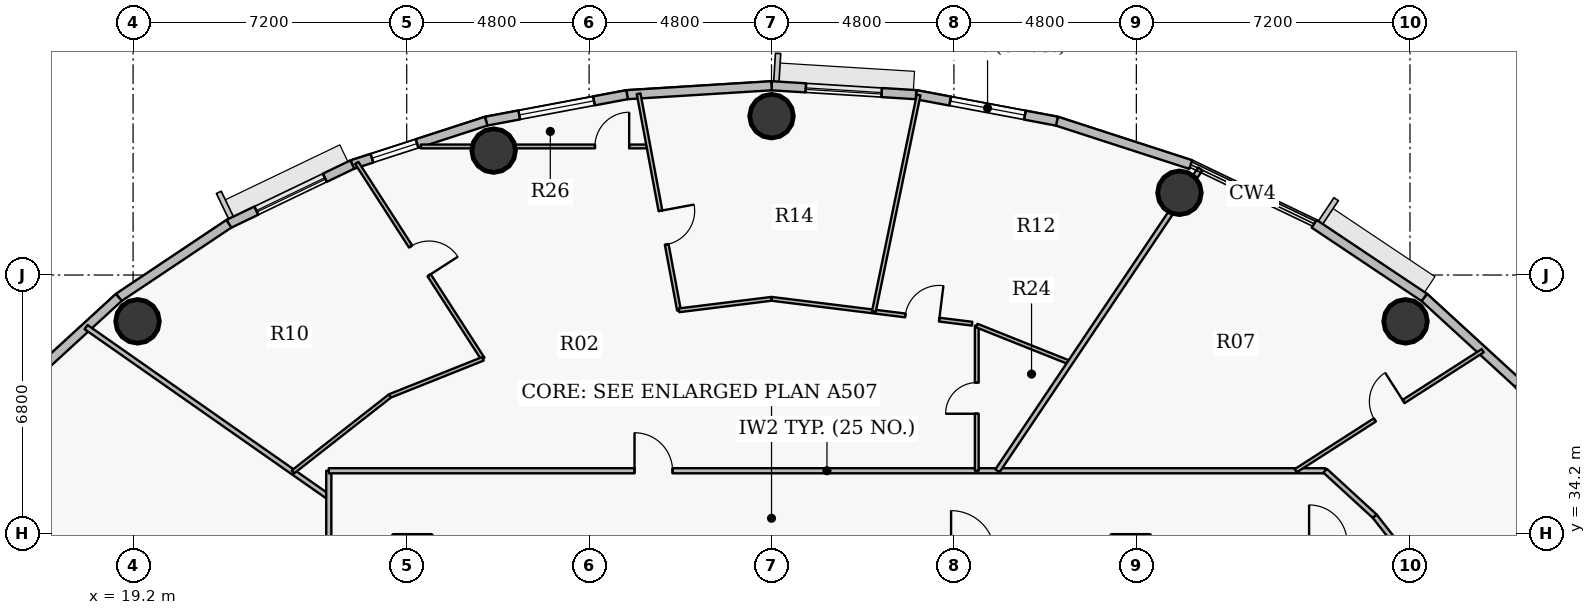
"""IFC4 building model, lengths in metres.
Left out: names, types, materials, properties, quantities, classifications, styles, units other than length and angle.
Written with IfcOpenShell. Run it as: python <this file> out.ifc"""

import sys

from ifc_helpers import new_model, si_unit, direction, frame, frame_2d, origin, origin_2d, place, context, subcontext, project, spatial, rectangle, hollow_circle, extrude, source, transform, mapped, element, fill, save


model = new_model("IFC4")
c1 = context("Model", 3, precision=1e-05, world=origin(), true_north=direction((0.0, 1.0)))
c2 = subcontext(c1, "Body", "Model", "MODEL_VIEW")
j1 = project(units=[si_unit("LENGTHUNIT", "METRE"), si_unit("PLANEANGLEUNIT", "RADIAN")], contexts=[c1])
p1 = place(None, origin())
s1 = spatial("IfcSite", under=j1, at=p1, CompositionType="ELEMENT")
p2 = place(p1, origin())
s2 = spatial("IfcBuilding", under=s1, at=p2, CompositionType="ELEMENT")
p3 = place(p2, frame((0.0, 0.0, 259.05)))
s3 = spatial("IfcBuildingStorey", under=s2, at=p3, CompositionType="ELEMENT", Elevation=259.05)
for number, where, z_axis, x_axis in (
    (1, (52.683, 39.781, 0.0), (0.0, 0.0, 1.0), (1.0, 0.0, 0.0)),
    (2, (46.735, 43.164, 0.0), (0.0, 0.0, 1.0), (1.0, 0.0, 0.0)),
    (3, (36.0, 45.18, 0.0), (0.0, 0.0, 1.0), (1.0, 0.0, 0.0)),
    (4, (28.688, 44.273, 0.0), (0.0, 0.0, 1.0), (1.0, 0.0, 0.0)),
    (5, (19.317, 39.781, 0.0), (0.0, 0.0, 1.0), (1.0, 0.0, 0.0)),
):
    element("IfcColumn", number, at=place(p3, frame(where, z_axis=z_axis, x_axis=x_axis)), inside=s3, PredefinedType="COLUMN", context=c2, shape_type="SweptSolid", body=[
        extrude(hollow_circle(Radius=0.575, WallThickness=0.036, at=origin_2d()), origin(), (0.0, 0.0, 1.0), 3.75),
    ])
p4 = place(p3, frame((55.648, 38.145, 0.0), z_axis=(0.0, 0.0, 1.0), x_axis=(0.616312344705, -0.787501805562, 0.0)))
e6 = element("IfcWall", 6, at=p4, inside=s3, PredefinedType="SOLIDWALL", context=c2, shape_type="SweptSolid", body=[
    extrude(rectangle(XDim=3.225, YDim=0.24, at=frame_2d((1.612, 0.0))), origin(), (0.0, 0.0, 1.0), 3.45),
])
p5 = place(p4, frame((0.812, 0.0, 0.9)))
e7 = element("IfcOpeningElement", 7, at=p5, cuts=e6, PredefinedType="OPENING", context=c2, shape_type="SweptSolid", body=[
    extrude(rectangle(XDim=1.6, YDim=1.75, at=origin_2d()), frame((0.8, 0.13, 0.875), z_axis=(0.0, -1.0, 0.0), x_axis=(1.0, 0.0, 0.0)), (0.0, 0.0, 1.0), 0.26),
])
p6 = place(p3, frame((53.176, 40.411, 0.0), z_axis=(0.0, 0.0, 1.0), x_axis=(0.737123922599, -0.675757591694, 0.0)))
e8 = element("IfcWall", 8, at=p6, inside=s3, PredefinedType="SOLIDWALL", context=c2, shape_type="SweptSolid", body=[
    extrude(rectangle(XDim=3.354, YDim=0.24, at=frame_2d((1.677, 0.0))), origin(), (0.0, 0.0, 1.0), 3.45),
])
p7 = place(p3, frame((50.28, 42.348, 0.0), z_axis=(0.0, 0.0, 1.0), x_axis=(0.831262496074, -0.555880079352, 0.0)))
e9 = element("IfcWall", 9, at=p7, inside=s3, PredefinedType="SOLIDWALL", context=c2, shape_type="SweptSolid", body=[
    extrude(rectangle(XDim=3.484, YDim=0.24, at=frame_2d((1.742, 0.0))), origin(), (0.0, 0.0, 1.0), 3.45),
])
p8 = place(p3, frame((43.509, 45.049, 0.0), z_axis=(0.0, 0.0, 1.0), x_axis=(0.951210789182, -0.308541787354, 0.0)))
e10 = element("IfcWall", 10, at=p8, inside=s3, PredefinedType="SOLIDWALL", context=c2, shape_type="SweptSolid", body=[
    extrude(rectangle(XDim=3.702, YDim=0.24, at=frame_2d((1.851, 0.0))), origin(), (0.0, 0.0, 1.0), 3.45),
])
p9 = place(p3, frame((39.802, 45.746, 0.0), z_axis=(0.0, 0.0, 1.0), x_axis=(0.982784898575, -0.184753465822, 0.0)))
e11 = element("IfcWall", 11, at=p9, inside=s3, PredefinedType="SOLIDWALL", context=c2, shape_type="SweptSolid", body=[
    extrude(rectangle(XDim=3.773, YDim=0.24, at=frame_2d((1.886, 0.0))), origin(), (0.0, 0.0, 1.0), 3.45),
])
p10 = place(p9, frame((0.916, 0.0, 0.9)))
e12 = element("IfcOpeningElement", 12, at=p10, cuts=e11, PredefinedType="OPENING", context=c2, shape_type="SweptSolid", body=[
    extrude(rectangle(XDim=2.0, YDim=1.75, at=origin_2d()), frame((1.0, 0.13, 0.875), z_axis=(0.0, -1.0, 0.0), x_axis=(1.0, 0.0, 0.0)), (0.0, 0.0, 1.0), 0.26),
])
p11 = place(p3, frame((36.0, 45.98, 0.0), z_axis=(0.0, 0.0, 1.0), x_axis=(0.998108785312, -0.06147237333, 0.0)))
e13 = element("IfcWall", 13, at=p11, inside=s3, PredefinedType="SOLIDWALL", context=c2, shape_type="SweptSolid", body=[
    extrude(rectangle(XDim=3.809, YDim=0.24, at=frame_2d((1.904, 0.0))), origin(), (0.0, 0.0, 1.0), 3.45),
])
p12 = place(p11, frame((0.904, 0.0, 0.9)))
e14 = element("IfcOpeningElement", 14, at=p12, cuts=e13, PredefinedType="OPENING", context=c2, shape_type="SweptSolid", body=[
    extrude(rectangle(XDim=2.0, YDim=1.75, at=origin_2d()), frame((1.0, 0.13, 0.875), z_axis=(0.0, -1.0, 0.0), x_axis=(1.0, 0.0, 0.0)), (0.0, 0.0, 1.0), 0.26),
])
p13 = place(p3, frame((32.198, 45.746, 0.0), z_axis=(0.0, 0.0, 1.0), x_axis=(0.998108785312, 0.06147237333, 0.0)))
e15 = element("IfcWall", 15, at=p13, inside=s3, PredefinedType="SOLIDWALL", context=c2, shape_type="SweptSolid", body=[
    extrude(rectangle(XDim=3.809, YDim=0.24, at=frame_2d((1.904, 0.0))), origin(), (0.0, 0.0, 1.0), 3.45),
])
p14 = place(p3, frame((28.491, 45.049, 0.0), z_axis=(0.0, 0.0, 1.0), x_axis=(0.982784898575, 0.184753465822, 0.0)))
e16 = element("IfcWall", 16, at=p14, inside=s3, PredefinedType="SOLIDWALL", context=c2, shape_type="SweptSolid", body=[
    extrude(rectangle(XDim=3.773, YDim=0.24, at=frame_2d((1.886, 0.0))), origin(), (0.0, 0.0, 1.0), 3.45),
])
p15 = place(p14, frame((0.886, 0.0, 0.9)))
e17 = element("IfcOpeningElement", 17, at=p15, cuts=e16, PredefinedType="OPENING", context=c2, shape_type="SweptSolid", body=[
    extrude(rectangle(XDim=2.0, YDim=1.75, at=origin_2d()), frame((1.0, 0.13, 0.875), z_axis=(0.0, -1.0, 0.0), x_axis=(1.0, 0.0, 0.0)), (0.0, 0.0, 1.0), 0.26),
])
p16 = place(p3, frame((24.969, 43.906, 0.0), z_axis=(0.0, 0.0, 1.0), x_axis=(0.951210789182, 0.308541787354, 0.0)))
e18 = element("IfcWall", 18, at=p16, inside=s3, PredefinedType="SOLIDWALL", context=c2, shape_type="SweptSolid", body=[
    extrude(rectangle(XDim=3.702, YDim=0.24, at=frame_2d((1.851, 0.0))), origin(), (0.0, 0.0, 1.0), 3.45),
])
p17 = place(p16, frame((0.542, 0.0, 0.9)))
e19 = element("IfcOpeningElement", 19, at=p17, cuts=e18, PredefinedType="OPENING", context=c2, shape_type="SweptSolid", body=[
    extrude(rectangle(XDim=1.25, YDim=1.65, at=origin_2d()), frame((0.625, 0.13, 0.825), z_axis=(0.0, -1.0, 0.0), x_axis=(1.0, 0.0, 0.0)), (0.0, 0.0, 1.0), 0.26),
])
p18 = place(p3, frame((21.72, 42.348, 0.0), z_axis=(0.0, 0.0, 1.0), x_axis=(0.901598104751, 0.432574684313, 0.0)))
e20 = element("IfcWall", 20, at=p18, inside=s3, PredefinedType="SOLIDWALL", context=c2, shape_type="SweptSolid", body=[
    extrude(rectangle(XDim=3.604, YDim=0.24, at=frame_2d((1.802, 0.0))), origin(), (0.0, 0.0, 1.0), 3.45),
])
p19 = place(p18, frame((0.802, 0.0, 0.9)))
e21 = element("IfcOpeningElement", 21, at=p19, cuts=e20, PredefinedType="OPENING", context=c2, shape_type="SweptSolid", body=[
    extrude(rectangle(XDim=2.0, YDim=1.75, at=origin_2d()), frame((1.0, 0.13, 0.875), z_axis=(0.0, -1.0, 0.0), x_axis=(1.0, 0.0, 0.0)), (0.0, 0.0, 1.0), 0.26),
])
p20 = place(p3, frame((18.824, 40.411, 0.0), z_axis=(0.0, 0.0, 1.0), x_axis=(0.831262496074, 0.555880079352, 0.0)))
e22 = element("IfcWall", 22, at=p20, inside=s3, PredefinedType="SOLIDWALL", context=c2, shape_type="SweptSolid", body=[
    extrude(rectangle(XDim=3.484, YDim=0.24, at=frame_2d((1.742, 0.0))), origin(), (0.0, 0.0, 1.0), 3.45),
])
p21 = place(p3, frame((16.352, 38.145, 0.0), z_axis=(0.0, 0.0, 1.0), x_axis=(0.737123922599, 0.675757591694, 0.0)))
e23 = element("IfcWall", 23, at=p21, inside=s3, PredefinedType="SOLIDWALL", context=c2, shape_type="SweptSolid", body=[
    extrude(rectangle(XDim=3.354, YDim=0.24, at=frame_2d((1.677, 0.0))), origin(), (0.0, 0.0, 1.0), 3.45),
])
p22 = place(p3, frame((17.964, 39.629, 0.0), z_axis=(0.0, 0.0, 1.0), x_axis=(0.819162769896, -0.573561118292, 0.0)))
e24 = element("IfcWall", 24, at=p22, inside=s3, PredefinedType="PARTITIONING", context=c2, shape_type="SweptSolid", body=[
    extrude(rectangle(XDim=7.796, YDim=0.135, at=frame_2d((3.898, 0.0))), origin(), (0.0, 0.0, 1.0), 2.935),
])
p23 = place(p3, frame((23.406, 35.819, 0.0), z_axis=(0.0, 0.0, 1.0), x_axis=(0.787387506959, 0.616458363465, 0.0)))
e25 = element("IfcWall", 25, at=p23, inside=s3, PredefinedType="PARTITIONING", context=c2, shape_type="SweptSolid", body=[
    extrude(rectangle(XDim=3.245, YDim=0.1, at=frame_2d((1.623, 0.0))), origin(), (0.0, 0.0, 1.0), 2.885),
])
p24 = place(p3, frame((24.35, 27.95, 0.0), z_axis=(0.0, 0.0, 1.0), x_axis=(0.0, 1.0, 0.0)))
e26 = element("IfcWall", 26, at=p24, inside=s3, PredefinedType="PARTITIONING", context=c2, shape_type="SweptSolid", body=[
    extrude(rectangle(XDim=7.9, YDim=0.135, at=frame_2d((3.95, 0.0))), origin(), (0.0, 0.0, 1.0), 2.885),
])
p25 = place(p24, frame((3.099, 0.0, 0.0)))
e27 = element("IfcOpeningElement", 27, at=p25, cuts=e26, PredefinedType="OPENING", context=c2, shape_type="SweptSolid", body=[
    extrude(rectangle(XDim=1.05, YDim=2.15, at=origin_2d()), frame((0.525, 0.078, 1.075), z_axis=(0.0, -1.0, 0.0), x_axis=(1.0, 0.0, 0.0)), (0.0, 0.0, 1.0), 0.155),
])
p26 = place(p3, frame((24.35, 35.85, 0.0), z_axis=(0.0, 0.0, 1.0), x_axis=(1.0, 0.0, 0.0)))
e28 = element("IfcWall", 28, at=p26, inside=s3, PredefinedType="PARTITIONING", context=c2, shape_type="SweptSolid", body=[
    extrude(rectangle(XDim=26.218, YDim=0.135, at=frame_2d((13.109, 0.0))), origin(), (0.0, 0.0, 1.0), 2.885),
])
p27 = place(p26, frame((8.045, 0.0, 0.0)))
e29 = element("IfcOpeningElement", 29, at=p27, cuts=e28, PredefinedType="OPENING", context=c2, shape_type="SweptSolid", body=[
    extrude(rectangle(XDim=1.0, YDim=2.15, at=origin_2d()), frame((0.5, 0.078, 1.075), z_axis=(0.0, -1.0, 0.0), x_axis=(1.0, 0.0, 0.0)), (0.0, 0.0, 1.0), 0.155),
])
p28 = place(p3, frame((25.086, 43.95, 0.0), z_axis=(0.0, 0.0, 1.0), x_axis=(0.54137931016, -0.840778474112, 0.0)))
e30 = element("IfcWall", 30, at=p28, inside=s3, PredefinedType="PARTITIONING", context=c2, shape_type="SweptSolid", body=[
    extrude(rectangle(XDim=6.131, YDim=0.1, at=frame_2d((3.066, 0.0))), origin(), (0.0, 0.0, 1.0), 2.935),
])
p29 = place(p28, frame((2.615, 0.0, 0.0)))
e31 = element("IfcOpeningElement", 31, at=p29, cuts=e30, PredefinedType="OPENING", context=c2, shape_type="SweptSolid", body=[
    extrude(rectangle(XDim=0.9, YDim=2.1, at=origin_2d()), frame((0.45, 0.06, 1.05), z_axis=(0.0, -1.0, 0.0), x_axis=(1.0, 0.0, 0.0)), (0.0, 0.0, 1.0), 0.12),
])
p30 = place(p3, frame((25.961, 37.819, 0.0), z_axis=(0.0, 0.0, 1.0), x_axis=(0.928796141516, 0.370591051572, 0.0)))
e32 = element("IfcWall", 32, at=p30, inside=s3, PredefinedType="PARTITIONING", context=c2, shape_type="SweptSolid", body=[
    extrude(rectangle(XDim=2.633, YDim=0.1, at=frame_2d((1.316, 0.0))), origin(), (0.0, 0.0, 1.0), 3.45),
])
p31 = place(p3, frame((26.772, 44.383, 0.0), z_axis=(0.0, 0.0, 1.0), x_axis=(1.0, 0.0, 0.0)))
e33 = element("IfcWall", 33, at=p31, inside=s3, PredefinedType="PARTITIONING", context=c2, shape_type="SweptSolid", body=[
    extrude(rectangle(XDim=5.99, YDim=0.1, at=frame_2d((2.995, 0.0))), origin(), (0.0, 0.0, 1.0), 2.935),
])
p32 = place(p31, frame((4.582, 0.0, 0.0)))
e34 = element("IfcOpeningElement", 34, at=p32, cuts=e33, PredefinedType="OPENING", context=c2, shape_type="SweptSolid", body=[
    extrude(rectangle(XDim=0.9, YDim=2.1, at=origin_2d()), frame((0.45, 0.06, 1.05), z_axis=(0.0, -1.0, 0.0), x_axis=(1.0, 0.0, 0.0)), (0.0, 0.0, 1.0), 0.12),
])
p33 = place(p3, frame((32.503, 45.77, 0.0), z_axis=(0.0, 0.0, 1.0), x_axis=(0.183138923076, -0.983087043376, 0.0)))
e35 = element("IfcWall", 35, at=p33, inside=s3, PredefinedType="PARTITIONING", context=c2, shape_type="SweptSolid", body=[
    extrude(rectangle(XDim=5.796, YDim=0.1, at=frame_2d((2.898, 0.0))), origin(), (0.0, 0.0, 1.0), 2.935),
])
p34 = place(p33, frame((3.133, 0.0, 0.0)))
e36 = element("IfcOpeningElement", 36, at=p34, cuts=e35, PredefinedType="OPENING", context=c2, shape_type="SweptSolid", body=[
    extrude(rectangle(XDim=0.9, YDim=2.1, at=origin_2d()), frame((0.45, 0.06, 1.05), z_axis=(0.0, -1.0, 0.0), x_axis=(1.0, 0.0, 0.0)), (0.0, 0.0, 1.0), 0.12),
])
p35 = place(p3, frame((33.565, 40.072, 0.0), z_axis=(0.0, 0.0, 1.0), x_axis=(0.992396815028, 0.1230794927, 0.0)))
e37 = element("IfcWall", 37, at=p35, inside=s3, PredefinedType="PARTITIONING", context=c2, shape_type="SweptSolid", body=[
    extrude(rectangle(XDim=2.454, YDim=0.1, at=frame_2d((1.227, 0.0))), origin(), (0.0, 0.0, 1.0), 2.885),
])
p36 = place(p3, frame((36.0, 40.374, 0.0), z_axis=(0.0, 0.0, 1.0), x_axis=(0.992398169186, -0.123068573551, 0.0)))
e38 = element("IfcWall", 38, at=p36, inside=s3, PredefinedType="PARTITIONING", context=c2, shape_type="SweptSolid", body=[
    extrude(rectangle(XDim=5.319, YDim=0.1, at=frame_2d((2.659, 0.0))), origin(), (0.0, 0.0, 1.0), 2.885),
])
p37 = place(p36, frame((3.546, 0.0, 0.0)))
e39 = element("IfcOpeningElement", 39, at=p37, cuts=e38, PredefinedType="OPENING", context=c2, shape_type="SweptSolid", body=[
    extrude(rectangle(XDim=0.9, YDim=2.1, at=origin_2d()), frame((0.45, 0.06, 1.05), z_axis=(0.0, -1.0, 0.0), x_axis=(1.0, 0.0, 0.0)), (0.0, 0.0, 1.0), 0.12),
])
p38 = place(p3, frame((38.694, 40.04, 0.0), z_axis=(0.0, 0.0, 1.0), x_axis=(0.20228508648, 0.979326678789, 0.0)))
e40 = element("IfcWall", 40, at=p38, inside=s3, PredefinedType="PARTITIONING", context=c2, shape_type="SweptSolid", body=[
    extrude(rectangle(XDim=5.819, YDim=0.1, at=frame_2d((2.909, 0.0))), origin(), (0.0, 0.0, 1.0), 2.935),
])
p39 = place(p3, frame((41.401, 35.85, 0.0), z_axis=(0.0, 0.0, 1.0), x_axis=(0.0, 1.0, 0.0)))
e41 = element("IfcWall", 41, at=p39, inside=s3, PredefinedType="PARTITIONING", context=c2, shape_type="SweptSolid", body=[
    extrude(rectangle(XDim=3.82, YDim=0.1, at=frame_2d((1.91, 0.0))), origin(), (0.0, 0.0, 1.0), 3.45),
])
p40 = place(p39, frame((1.5, 0.0, 0.0)))
e42 = element("IfcOpeningElement", 42, at=p40, cuts=e41, PredefinedType="OPENING", context=c2, shape_type="SweptSolid", body=[
    extrude(rectangle(XDim=0.82, YDim=2.1, at=origin_2d()), frame((0.41, 0.06, 1.05), z_axis=(0.0, -1.0, 0.0), x_axis=(1.0, 0.0, 0.0)), (0.0, 0.0, 1.0), 0.12),
])
p41 = place(p3, frame((41.401, 39.67, 0.0), z_axis=(0.0, 0.0, 1.0), x_axis=(0.92880772077, -0.370562029677, 0.0)))
e43 = element("IfcWall", 43, at=p41, inside=s3, PredefinedType="PARTITIONING", context=c2, shape_type="SweptSolid", body=[
    extrude(rectangle(XDim=2.642, YDim=0.1, at=frame_2d((1.321, 0.0))), origin(), (0.0, 0.0, 1.0), 2.885),
])
p42 = place(p3, frame((41.946, 35.85, 0.0), z_axis=(0.0, 0.0, 1.0), x_axis=(0.557670345873, 0.830062518931, 0.0)))
e44 = element("IfcWall", 44, at=p42, inside=s3, PredefinedType="PARTITIONING", context=c2, shape_type="SweptSolid", body=[
    extrude(rectangle(XDim=9.568, YDim=0.135, at=frame_2d((4.784, 0.0))), origin(), (0.0, 0.0, 1.0), 2.885),
])
p43 = place(p3, frame((49.792, 35.85, 0.0), z_axis=(0.0, 0.0, 1.0), x_axis=(0.841640734873, 0.540037844416, 0.0)))
e45 = element("IfcWall", 45, at=p43, inside=s3, PredefinedType="PARTITIONING", context=c2, shape_type="SweptSolid", body=[
    extrude(rectangle(XDim=5.848, YDim=0.1, at=frame_2d((2.924, 0.0))), origin(), (0.0, 0.0, 1.0), 2.935),
])
p44 = place(p43, frame((2.474, 0.0, 0.0)))
e46 = element("IfcOpeningElement", 46, at=p44, cuts=e45, PredefinedType="OPENING", context=c2, shape_type="SweptSolid", body=[
    extrude(rectangle(XDim=0.9, YDim=2.1, at=origin_2d()), frame((0.45, 0.06, 1.05), z_axis=(0.0, -1.0, 0.0), x_axis=(1.0, 0.0, 0.0)), (0.0, 0.0, 1.0), 0.12),
])
p45 = place(p3, frame((50.568, 35.85, 0.0), z_axis=(0.0, 0.0, 1.0), x_axis=(0.737102657331, -0.675780787353, 0.0)))
e47 = element("IfcWall", 47, at=p45, inside=s3, PredefinedType="PARTITIONING", context=c2, shape_type="SweptSolid", body=[
    extrude(rectangle(XDim=1.772, YDim=0.135, at=frame_2d((0.886, 0.0))), origin(), (0.0, 0.0, 1.0), 3.45),
])
p46 = place(p3, frame((51.874, 34.653, 0.0), z_axis=(0.0, 0.0, 1.0), x_axis=(0.61628613448, -0.787522317429, 0.0)))
e48 = element("IfcWall", 48, at=p46, inside=s3, PredefinedType="PARTITIONING", context=c2, shape_type="SweptSolid", body=[
    extrude(rectangle(XDim=0.893, YDim=0.135, at=frame_2d((0.446, 0.0))), origin(), (0.0, 0.0, 1.0), 3.45),
])
m1 = source(origin(), c2, "Body", "SweptSolid", [
    extrude(rectangle(XDim=2.0, YDim=1.75, at=origin_2d()), frame((1.0, 0.03, 0.875), z_axis=(0.0, -1.0, 0.0), x_axis=(1.0, 0.0, 0.0)), (0.0, 0.0, 1.0), 0.06),
])
p47 = place(p10, origin())
e49 = element("IfcWindow", 49, at=p47, inside=s3, PartitioningType="DOUBLE_PANEL_VERTICAL", PredefinedType="WINDOW", context=c2, shape_type="MappedRepresentation", body=[
    mapped(m1, transform((0.0, 0.0, 0.0), x_axis=(1.0, 0.0, 0.0), y_axis=(0.0, 1.0, 0.0), z_axis=(0.0, 0.0, 1.0), scale=1.0)),
])
fill(e12, e49)
p48 = place(p12, origin())
e50 = element("IfcWindow", 50, at=p48, inside=s3, PartitioningType="DOUBLE_PANEL_VERTICAL", PredefinedType="WINDOW", context=c2, shape_type="MappedRepresentation", body=[
    mapped(m1, transform((0.0, 0.0, 0.0), x_axis=(1.0, 0.0, 0.0), y_axis=(0.0, 1.0, 0.0), z_axis=(0.0, 0.0, 1.0), scale=1.0)),
])
fill(e14, e50)
p49 = place(p15, origin())
e51 = element("IfcWindow", 51, at=p49, inside=s3, PartitioningType="DOUBLE_PANEL_VERTICAL", PredefinedType="WINDOW", context=c2, shape_type="MappedRepresentation", body=[
    mapped(m1, transform((0.0, 0.0, 0.0), x_axis=(1.0, 0.0, 0.0), y_axis=(0.0, 1.0, 0.0), z_axis=(0.0, 0.0, 1.0), scale=1.0)),
])
fill(e17, e51)
p50 = place(p19, origin())
e52 = element("IfcWindow", 52, at=p50, inside=s3, PartitioningType="DOUBLE_PANEL_VERTICAL", PredefinedType="WINDOW", context=c2, shape_type="MappedRepresentation", body=[
    mapped(m1, transform((0.0, 0.0, 0.0), x_axis=(1.0, 0.0, 0.0), y_axis=(0.0, 1.0, 0.0), z_axis=(0.0, 0.0, 1.0), scale=1.0)),
])
fill(e21, e52)
m2 = source(origin(), c2, "Body", "SweptSolid", [
    extrude(rectangle(XDim=1.25, YDim=1.65, at=origin_2d()), frame((0.625, 0.03, 0.825), z_axis=(0.0, -1.0, 0.0), x_axis=(1.0, 0.0, 0.0)), (0.0, 0.0, 1.0), 0.06),
])
p51 = place(p17, origin())
e53 = element("IfcWindow", 53, at=p51, inside=s3, PartitioningType="SINGLE_PANEL", PredefinedType="WINDOW", context=c2, shape_type="MappedRepresentation", body=[
    mapped(m2, transform((0.0, 0.0, 0.0), x_axis=(1.0, 0.0, 0.0), y_axis=(0.0, 1.0, 0.0), z_axis=(0.0, 0.0, 1.0), scale=1.0)),
])
fill(e19, e53)
m3 = source(origin(), c2, "Body", "SweptSolid", [
    extrude(rectangle(XDim=0.9, YDim=2.1, at=origin_2d()), frame((0.45, 0.025, 1.05), z_axis=(0.0, -1.0, 0.0), x_axis=(1.0, 0.0, 0.0)), (0.0, 0.0, 1.0), 0.05),
])
p52 = place(p44, origin())
e54 = element("IfcDoor", 54, at=p52, inside=s3, OperationType="SINGLE_SWING_RIGHT", PredefinedType="DOOR", context=c2, shape_type="MappedRepresentation", body=[
    mapped(m3, transform((0.0, 0.0, 0.0), x_axis=(1.0, 0.0, 0.0), y_axis=(0.0, 1.0, 0.0), z_axis=(0.0, 0.0, 1.0), scale=1.0)),
])
fill(e46, e54)
m4 = source(origin(), c2, "Body", "SweptSolid", [
    extrude(rectangle(XDim=1.0, YDim=2.15, at=origin_2d()), frame((0.5, 0.025, 1.075), z_axis=(0.0, -1.0, 0.0), x_axis=(1.0, 0.0, 0.0)), (0.0, 0.0, 1.0), 0.05),
])
p53 = place(p27, origin())
e55 = element("IfcDoor", 55, at=p53, inside=s3, OperationType="SINGLE_SWING_LEFT", PredefinedType="DOOR", context=c2, shape_type="MappedRepresentation", body=[
    mapped(m4, transform((0.0, 0.0, 0.0), x_axis=(1.0, 0.0, 0.0), y_axis=(0.0, 1.0, 0.0), z_axis=(0.0, 0.0, 1.0), scale=1.0)),
])
fill(e29, e55)
p54 = place(p37, origin())
e56 = element("IfcDoor", 56, at=p54, inside=s3, OperationType="SINGLE_SWING_RIGHT", PredefinedType="DOOR", context=c2, shape_type="MappedRepresentation", body=[
    mapped(m3, transform((0.0, 0.0, 0.0), x_axis=(1.0, 0.0, 0.0), y_axis=(0.0, 1.0, 0.0), z_axis=(0.0, 0.0, 1.0), scale=1.0)),
])
fill(e39, e56)
p55 = place(p34, origin())
e57 = element("IfcDoor", 57, at=p55, inside=s3, OperationType="SINGLE_SWING_LEFT", PredefinedType="DOOR", context=c2, shape_type="MappedRepresentation", body=[
    mapped(m3, transform((0.0, 0.0, 0.0), x_axis=(1.0, 0.0, 0.0), y_axis=(0.0, 1.0, 0.0), z_axis=(0.0, 0.0, 1.0), scale=1.0)),
])
fill(e36, e57)
p56 = place(p29, origin())
e58 = element("IfcDoor", 58, at=p56, inside=s3, OperationType="SINGLE_SWING_RIGHT", PredefinedType="DOOR", context=c2, shape_type="MappedRepresentation", body=[
    mapped(m3, transform((0.0, 0.0, 0.0), x_axis=(1.0, 0.0, 0.0), y_axis=(0.0, 1.0, 0.0), z_axis=(0.0, 0.0, 1.0), scale=1.0)),
])
fill(e31, e58)
m5 = source(origin(), c2, "Body", "SweptSolid", [
    extrude(rectangle(XDim=0.82, YDim=2.1, at=origin_2d()), frame((0.41, 0.025, 1.05), z_axis=(0.0, -1.0, 0.0), x_axis=(1.0, 0.0, 0.0)), (0.0, 0.0, 1.0), 0.05),
])
p57 = place(p40, origin())
e59 = element("IfcDoor", 59, at=p57, inside=s3, OperationType="SINGLE_SWING_LEFT", PredefinedType="DOOR", context=c2, shape_type="MappedRepresentation", body=[
    mapped(m5, transform((0.0, 0.0, 0.0), x_axis=(1.0, 0.0, 0.0), y_axis=(0.0, 1.0, 0.0), z_axis=(0.0, 0.0, 1.0), scale=1.0)),
])
fill(e42, e59)
p58 = place(p32, origin())
e60 = element("IfcDoor", 60, at=p58, inside=s3, OperationType="SINGLE_SWING_RIGHT", PredefinedType="DOOR", context=c2, shape_type="MappedRepresentation", body=[
    mapped(m3, transform((0.0, 0.0, 0.0), x_axis=(1.0, 0.0, 0.0), y_axis=(0.0, 1.0, 0.0), z_axis=(0.0, 0.0, 1.0), scale=1.0)),
])
fill(e34, e60)
save(model, sys.argv[1])
